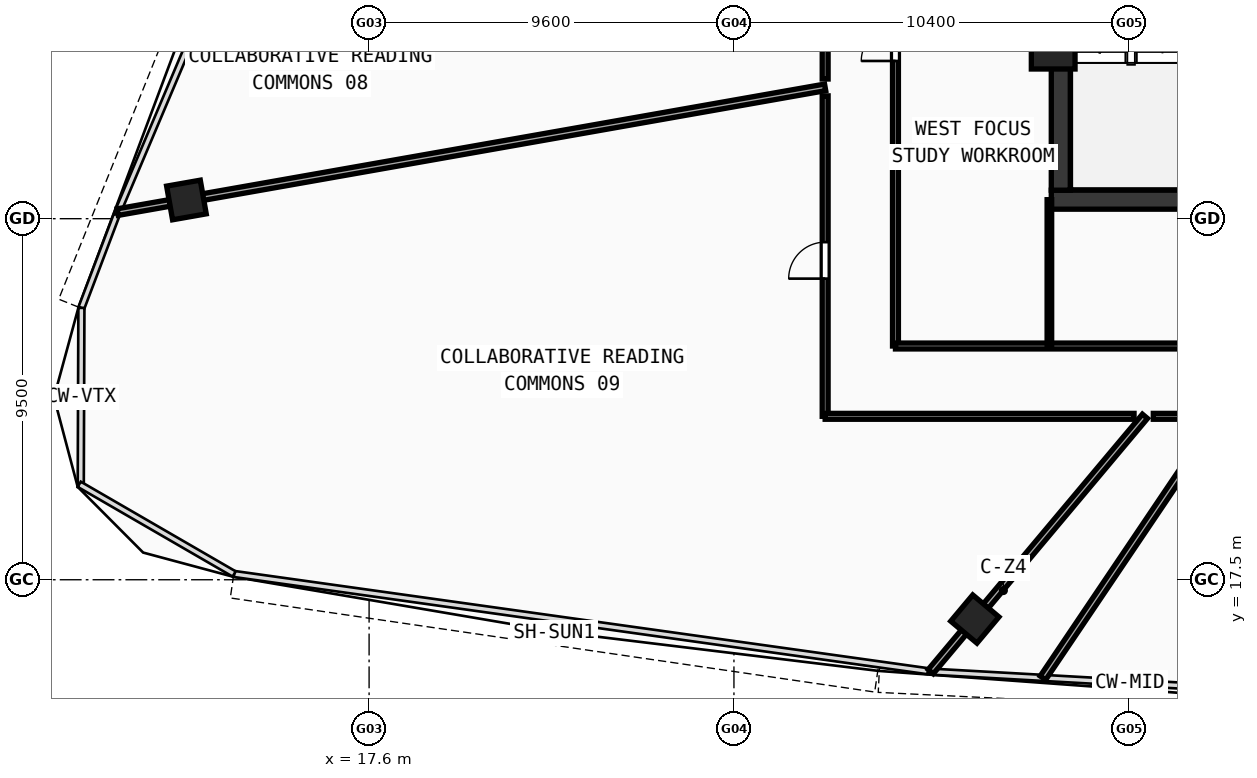
"""IFC4 building model, lengths in metres.
Left out: names, types, materials, properties, quantities, classifications, styles, units other than length and angle.
Written with IfcOpenShell. Run it as: python <this file> out.ifc"""

import sys

from ifc_helpers import new_model, si_unit, direction, frame, frame_2d, origin, origin_with_axes, origin_2d, place, context, subcontext, project, spatial, rectangle, hollow_rectangle, extrude, source, transform, mapped, element, fill, save


model = new_model("IFC4")
c1 = context("Model", 3, precision=1e-05, world=origin(), true_north=direction((0.0, 1.0)))
c2 = subcontext(c1, "Body", "Model", "MODEL_VIEW")
j1 = project(units=[si_unit("LENGTHUNIT", "METRE"), si_unit("PLANEANGLEUNIT", "RADIAN")], contexts=[c1])
p1 = place(None, origin())
s1 = spatial("IfcSite", under=j1, at=p1, CompositionType="ELEMENT")
p2 = place(p1, origin())
s2 = spatial("IfcBuilding", under=s1, at=p2, CompositionType="ELEMENT")
p3 = place(p2, frame((0.0, 0.0, 203.76)))
s3 = spatial("IfcBuildingStorey", under=s2, at=p3, CompositionType="ELEMENT", Elevation=203.76)
p4 = place(p3, frame((35.55, 27.5, 0.0), z_axis=(0.0, 0.0, 1.0), x_axis=(1.0, 0.0, 0.0)))
e1 = element("IfcWall", 1, at=p4, inside=s3, PredefinedType="SHEAR", context=c2, shape_type="SweptSolid", body=[
    extrude(rectangle(XDim=24.9, YDim=0.5, at=frame_2d((12.45, 0.0))), origin(), (0.0, 0.0, 1.0), 3.54),
])
p5 = place(p3, frame((35.8, 27.75, 0.0), z_axis=(0.0, 0.0, 1.0), x_axis=(0.0, 1.0, 0.0)))
e2 = element("IfcWall", 2, at=p5, inside=s3, PredefinedType="SHEAR", context=c2, shape_type="SweptSolid", body=[
    extrude(rectangle(XDim=12.2, YDim=0.5, at=frame_2d((6.1, 0.0))), origin(), (0.0, 0.0, 1.0), 3.54),
])
m1 = source(origin(), c2, "Body", "SweptSolid", [
    extrude(hollow_rectangle(XDim=1.15, YDim=1.15, WallThickness=0.048, at=origin_2d()), origin(), (0.0, 0.0, 1.0), 3.8),
])
p6 = place(p3, frame((35.6, 31.513, -0.26), z_axis=(0.0, 0.0, 1.0), x_axis=(1.0, 0.0, 0.0)))
e3 = element("IfcColumn", 3, at=p6, inside=s3, PredefinedType="COLUMN", context=c2, shape_type="MappedRepresentation", body=[
    mapped(m1, transform((0.0, 0.0, 0.0), scale=1.0)),
])
m2 = source(origin(), c2, "Body", "SweptSolid", [
    extrude(hollow_rectangle(XDim=0.9, YDim=0.9, WallThickness=0.036, at=origin_2d()), origin(), (0.0, 0.0, 1.0), 3.8),
])
for number, where, z_axis, x_axis in (
    (4, (33.539, 16.466, -0.26), (0.0, 0.0, 1.0), (0.766, -0.643, 0.0)),
    (5, (12.793, 27.492, -0.26), (0.0, 0.0, 1.0), (0.174, -0.985, 0.0)),
):
    element("IfcColumn", number, at=place(p3, frame(where, z_axis=z_axis, x_axis=x_axis)), inside=s3, PredefinedType="COLUMN", context=c2, shape_type="MappedRepresentation", body=[
        mapped(m2, transform((0.0, 0.0, 0.0), scale=1.0)),
    ])
p7 = place(p3, frame((31.45, 23.65, 0.0), z_axis=(0.0, 0.0, 1.0), x_axis=(0.0, 1.0, 0.0)))
e6 = element("IfcWall", 6, at=p7, inside=s3, PredefinedType="PARTITIONING", context=c2, shape_type="SweptSolid", body=[
    extrude(rectangle(XDim=16.6, YDim=0.155, at=frame_2d((8.3, 0.0))), origin(), (0.0, 0.0, 1.0), 2.89),
])
p8 = place(p7, frame((7.5, 0.0, 0.0)))
e7 = element("IfcOpeningElement", 7, at=p8, cuts=e6, PredefinedType="OPENING", context=c2, shape_type="SweptSolid", body=[
    extrude(rectangle(XDim=0.9, YDim=2.08, at=frame_2d((0.45, 1.04))), frame((0.0, 0.087, 0.0), z_axis=(0.0, -1.0, 0.0), x_axis=(1.0, 0.0, 0.0)), (0.0, 0.0, 1.0), 0.175),
])
p9 = place(p3, frame((31.45, 23.65, 0.0), z_axis=(0.0, 0.0, 1.0), x_axis=(1.0, 0.0, 0.0)))
e8 = element("IfcWall", 8, at=p9, inside=s3, PredefinedType="PARTITIONING", context=c2, shape_type="SweptSolid", body=[
    extrude(rectangle(XDim=33.1, YDim=0.155, at=frame_2d((16.55, 0.0))), origin(), (0.0, 0.0, 1.0), 2.89),
])
p10 = place(p9, frame((16.0, 0.0, 0.0)))
e9 = element("IfcOpeningElement", 9, at=p10, cuts=e8, PredefinedType="OPENING", context=c2, shape_type="SweptSolid", body=[
    extrude(rectangle(XDim=0.92, YDim=2.1, at=frame_2d((0.46, 1.05))), frame((0.0, 0.087, 0.0), z_axis=(0.0, -1.0, 0.0), x_axis=(1.0, 0.0, 0.0)), (0.0, 0.0, 1.0), 0.175),
])
p11 = place(p3, frame((35.5, 23.65, 0.0), z_axis=(0.0, 0.0, 1.0), x_axis=(0.0, 1.0, 0.0)))
e10 = element("IfcWall", 10, at=p11, inside=s3, PredefinedType="PARTITIONING", context=c2, shape_type="SweptSolid", body=[
    extrude(rectangle(XDim=3.85, YDim=0.12, at=frame_2d((1.925, 0.0))), origin(), (0.0, 0.0, 1.0), 3.14),
])
p12 = place(p3, frame((29.6, 30.456, 0.0), z_axis=(0.0, 0.0, 1.0), x_axis=(-0.984807864876, -0.173647543254, 0.0)))
e11 = element("IfcWall", 11, at=p12, inside=s3, PredefinedType="PARTITIONING", context=c2, shape_type="SweptSolid", body=[
    extrude(rectangle(XDim=18.902, YDim=0.175, at=frame_2d((9.451, 0.0))), origin(), (0.0, 0.0, 1.0), 2.89),
])
p13 = place(p3, frame((38.015, 21.8, 0.0), z_axis=(0.0, 0.0, 1.0), x_axis=(-0.642774108653, -0.766055771629, 0.0)))
e12 = element("IfcWall", 12, at=p13, inside=s3, PredefinedType="PARTITIONING", context=c2, shape_type="SweptSolid", body=[
    extrude(rectangle(XDim=8.769, YDim=0.175, at=frame_2d((4.385, 0.0))), origin(), (0.0, 0.0, 1.0), 2.89),
])
p14 = place(p3, frame((39.973, 21.8, 0.0), z_axis=(0.0, 0.0, 1.0), x_axis=(-0.559191496738, -0.829038521406, 0.0)))
e13 = element("IfcWall", 13, at=p14, inside=s3, PredefinedType="PARTITIONING", context=c2, shape_type="SweptSolid", body=[
    extrude(rectangle(XDim=8.302, YDim=0.175, at=frame_2d((4.151, 0.0))), origin(), (0.0, 0.0, 1.0), 2.89),
])
p15 = place(p3, frame((29.6, 21.8, 0.0), z_axis=(0.0, 0.0, 1.0), x_axis=(0.0, 1.0, 0.0)))
e14 = element("IfcWall", 14, at=p15, inside=s3, PredefinedType="PARTITIONING", context=c2, shape_type="SweptSolid", body=[
    extrude(rectangle(XDim=8.432, YDim=0.155, at=frame_2d((4.216, 0.0))), origin(), (0.0, 0.0, 1.0), 3.14),
])
p16 = place(p15, frame((3.623, 0.0, 0.0)))
e15 = element("IfcOpeningElement", 15, at=p16, cuts=e14, PredefinedType="OPENING", context=c2, shape_type="SweptSolid", body=[
    extrude(rectangle(XDim=0.96, YDim=2.12, at=frame_2d((0.48, 1.06))), frame((0.0, 0.087, 0.0), z_axis=(0.0, -1.0, 0.0), x_axis=(1.0, 0.0, 0.0)), (0.0, 0.0, 1.0), 0.175),
])
p17 = place(p3, frame((29.6, 30.675, 0.0), z_axis=(0.0, 0.0, 1.0), x_axis=(0.0, 1.0, 0.0)))
e16 = element("IfcWall", 16, at=p17, inside=s3, PredefinedType="PARTITIONING", context=c2, shape_type="SweptSolid", body=[
    extrude(rectangle(XDim=2.805, YDim=0.155, at=frame_2d((1.402, 0.0))), origin(), (0.0, 0.0, 1.0), 3.54),
])
p18 = place(p17, frame((0.927, 0.0, 0.0)))
e17 = element("IfcOpeningElement", 17, at=p18, cuts=e16, PredefinedType="OPENING", context=c2, shape_type="SweptSolid", body=[
    extrude(rectangle(XDim=0.96, YDim=2.12, at=frame_2d((0.48, 1.06))), frame((0.0, 0.087, 0.0), z_axis=(0.0, -1.0, 0.0), x_axis=(1.0, 0.0, 0.0)), (0.0, 0.0, 1.0), 0.175),
])
p19 = place(p3, frame((39.708, 21.8, 0.0), z_axis=(0.0, 0.0, 1.0), x_axis=(-1.0, 0.0, 0.0)))
e18 = element("IfcWall", 18, at=p19, inside=s3, PredefinedType="PARTITIONING", context=c2, shape_type="SweptSolid", body=[
    extrude(rectangle(XDim=1.473, YDim=0.155, at=frame_2d((0.737, 0.0))), origin(), (0.0, 0.0, 1.0), 2.89),
])
p20 = place(p3, frame((37.728, 21.8, 0.0), z_axis=(0.0, 0.0, 1.0), x_axis=(-1.0, 0.0, 0.0)))
e19 = element("IfcWall", 19, at=p20, inside=s3, PredefinedType="PARTITIONING", context=c2, shape_type="SweptSolid", body=[
    extrude(rectangle(XDim=8.127, YDim=0.155, at=frame_2d((4.064, 0.0))), origin(), (0.0, 0.0, 1.0), 3.14),
])
m3 = source(origin(), c2, "Body", "SweptSolid", [
    extrude(rectangle(XDim=0.9, YDim=2.08, at=frame_2d((0.45, 1.04))), frame((0.0, 0.025, 0.0), z_axis=(0.0, -1.0, 0.0), x_axis=(1.0, 0.0, 0.0)), (0.0, 0.0, 1.0), 0.05),
])
p21 = place(p8, origin_with_axes())
e20 = element("IfcDoor", 20, at=p21, inside=s3, OperationType="SINGLE_SWING_LEFT", PredefinedType="DOOR", context=c2, shape_type="MappedRepresentation", body=[
    mapped(m3, transform((0.0, 0.0, 0.0), scale=1.0)),
])
fill(e7, e20)
m4 = source(origin(), c2, "Body", "SweptSolid", [
    extrude(rectangle(XDim=0.96, YDim=2.12, at=frame_2d((0.48, 1.06))), frame((0.0, 0.025, 0.0), z_axis=(0.0, -1.0, 0.0), x_axis=(1.0, 0.0, 0.0)), (0.0, 0.0, 1.0), 0.05),
])
p22 = place(p16, origin_with_axes())
e21 = element("IfcDoor", 21, at=p22, inside=s3, OperationType="SINGLE_SWING_LEFT", PredefinedType="DOOR", context=c2, shape_type="MappedRepresentation", body=[
    mapped(m4, transform((0.0, 0.0, 0.0), scale=1.0)),
])
fill(e15, e21)
save(model, sys.argv[1])
